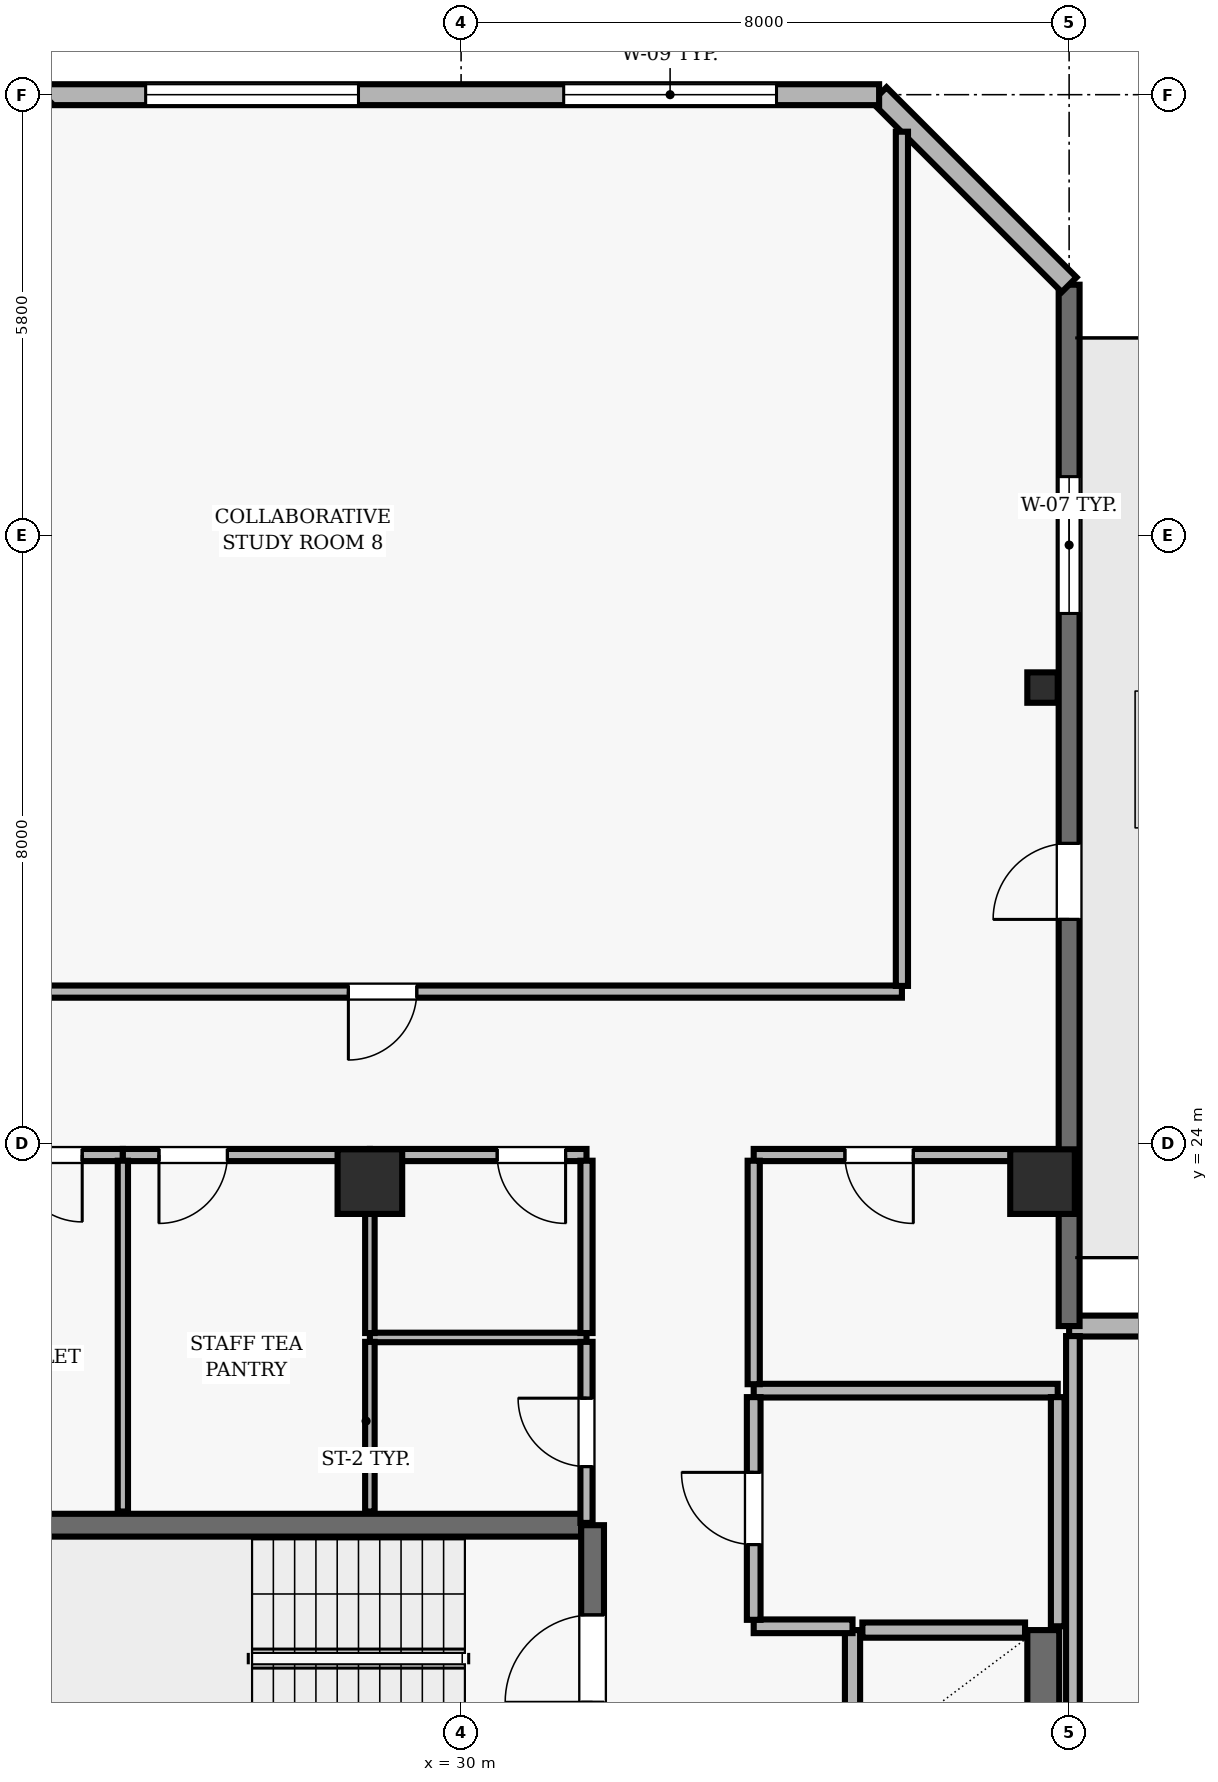
"""IFC4 building model, lengths in metres.
Left out: names, types, materials, properties, quantities, classifications, styles, units other than length and angle.
Written with IfcOpenShell. Run it as: python <this file> out.ifc"""

import sys

from ifc_helpers import new_model, si_unit, direction, frame, frame_2d, origin, origin_2d, place, context, subcontext, project, spatial, rectangle, hollow_rectangle, extrude, element, fill, save


model = new_model("IFC4")
c1 = context("Model", 3, precision=1e-05, world=origin(), true_north=direction((0.0, 1.0)))
c2 = subcontext(c1, "Body", "Model", "MODEL_VIEW")
j1 = project(units=[si_unit("LENGTHUNIT", "METRE"), si_unit("PLANEANGLEUNIT", "RADIAN")], contexts=[c1])
p1 = place(None, origin())
s1 = spatial("IfcSite", under=j1, at=p1, CompositionType="ELEMENT")
p2 = place(p1, origin())
s2 = spatial("IfcBuilding", under=s1, at=p2, CompositionType="ELEMENT")
p3 = place(p2, frame((0.0, 0.0, 287.2)))
s3 = spatial("IfcBuildingStorey", under=s2, at=p3, CompositionType="ELEMENT", Elevation=287.2)
for number, where, z_axis, x_axis in (
    (1, (28.8, 23.5, 0.0), (0.0, 0.0, 1.0), (1.0, 0.0, 0.0)),
    (2, (37.65, 23.5, 0.0), (0.0, 0.0, 1.0), (1.0, 0.0, 0.0)),
):
    element("IfcColumn", number, at=place(p3, frame(where, z_axis=z_axis, x_axis=x_axis)), inside=s3, PredefinedType="COLUMN", context=c2, shape_type="SweptSolid", body=[
        extrude(rectangle(XDim=0.85, YDim=0.85, at=origin_2d()), origin(), (0.0, 0.0, 1.0), 3.9),
    ])
p4 = place(p3, frame((37.65, 30.0, 0.0), z_axis=(0.0, 0.0, 1.0), x_axis=(1.0, 0.0, 0.0)))
e3 = element("IfcColumn", 3, at=p4, inside=s3, PredefinedType="COLUMN", context=c2, shape_type="SweptSolid", body=[
    extrude(hollow_rectangle(XDim=0.4, YDim=0.4, WallThickness=0.02, at=origin_2d()), origin(), (0.0, 0.0, 1.0), 3.9),
])
p5 = place(p3, frame((43.0, 21.6, 0.0), z_axis=(0.0, 0.0, 1.0), x_axis=(-1.0, 0.0, 0.0)))
e4 = element("IfcWall", 4, at=p5, inside=s3, PredefinedType="SOLIDWALL", context=c2, shape_type="SweptSolid", body=[
    extrude(rectangle(XDim=5.0, YDim=0.275, at=frame_2d((2.5, 0.0))), origin(), (0.0, 0.0, 1.0), 3.69),
])
p6 = place(p3, frame((38.0, 21.6, 0.0), z_axis=(0.0, 0.0, 1.0), x_axis=(0.0, 1.0, 0.0)))
e5 = element("IfcWall", 5, at=p6, inside=s3, PredefinedType="SOLIDWALL", context=c2, shape_type="SweptSolid", body=[
    extrude(rectangle(XDim=13.7, YDim=0.275, at=frame_2d((6.85, 0.0))), origin(), (0.0, 0.0, 1.0), 3.69),
])
p7 = place(p6, frame((5.35, 0.0, 0.0)))
e6 = element("IfcOpeningElement", 6, at=p7, cuts=e5, PredefinedType="OPENING", context=c2, shape_type="SweptSolid", body=[
    extrude(rectangle(XDim=1.0, YDim=2.2, at=frame_2d((0.5, 1.1))), frame((0.0, 0.147, 0.0), z_axis=(0.0, -1.0, 0.0), x_axis=(1.0, 0.0, 0.0)), (0.0, 0.0, 1.0), 0.295),
])
p8 = place(p6, frame((9.375, 0.0, 0.9)))
e7 = element("IfcOpeningElement", 7, at=p8, cuts=e5, PredefinedType="OPENING", context=c2, shape_type="SweptSolid", body=[
    extrude(rectangle(XDim=1.8, YDim=1.8, at=frame_2d((0.9, 0.9))), frame((0.0, 0.147, 0.0), z_axis=(0.0, -1.0, 0.0), x_axis=(1.0, 0.0, 0.0)), (0.0, 0.0, 1.0), 0.295),
])
p9 = place(p3, frame((38.0, 35.3, 0.0), z_axis=(0.0, 0.0, 1.0), x_axis=(-0.707106781187, 0.707106781187, 0.0)))
e8 = element("IfcWall", 8, at=p9, inside=s3, PredefinedType="SOLIDWALL", context=c2, shape_type="SweptSolid", body=[
    extrude(rectangle(XDim=3.536, YDim=0.275, at=frame_2d((1.768, 0.0))), origin(), (0.0, 0.0, 1.0), 3.69),
])
p10 = place(p3, frame((35.5, 37.8, 0.0), z_axis=(0.0, 0.0, 1.0), x_axis=(-1.0, 0.0, 0.0)))
e9 = element("IfcWall", 9, at=p10, inside=s3, PredefinedType="SOLIDWALL", context=c2, shape_type="SweptSolid", body=[
    extrude(rectangle(XDim=11.0, YDim=0.275, at=frame_2d((5.5, 0.0))), origin(), (0.0, 0.0, 1.0), 3.69),
])
p11 = place(p10, frame((1.35, 0.0, 0.9)))
e10 = element("IfcOpeningElement", 10, at=p11, cuts=e9, PredefinedType="OPENING", context=c2, shape_type="SweptSolid", body=[
    extrude(rectangle(XDim=2.8, YDim=1.8, at=frame_2d((1.4, 0.9))), frame((0.0, 0.147, 0.0), z_axis=(0.0, -1.0, 0.0), x_axis=(1.0, 0.0, 0.0)), (0.0, 0.0, 1.0), 0.295),
])
p12 = place(p10, frame((6.85, 0.0, 0.9)))
e11 = element("IfcOpeningElement", 11, at=p12, cuts=e9, PredefinedType="OPENING", context=c2, shape_type="SweptSolid", body=[
    extrude(rectangle(XDim=2.8, YDim=1.8, at=frame_2d((1.4, 0.9))), frame((0.0, 0.147, 0.0), z_axis=(0.0, -1.0, 0.0), x_axis=(1.0, 0.0, 0.0)), (0.0, 0.0, 1.0), 0.295),
])
p13 = place(p3, frame((31.58, 18.98, 0.0), z_axis=(0.0, 0.0, 1.0), x_axis=(-1.0, 0.0, 0.0)))
e12 = element("IfcWall", 12, at=p13, inside=s3, PredefinedType="SHEAR", context=c2, shape_type="SweptSolid", body=[
    extrude(rectangle(XDim=8.36, YDim=0.3, at=frame_2d((4.18, 0.0))), origin(), (0.0, 0.0, 1.0), 3.69),
])
p14 = place(p3, frame((31.73, 15.47, 0.0), z_axis=(0.0, 0.0, 1.0), x_axis=(0.0, 1.0, 0.0)))
e13 = element("IfcWall", 13, at=p14, inside=s3, PredefinedType="SHEAR", context=c2, shape_type="SweptSolid", body=[
    extrude(rectangle(XDim=3.51, YDim=0.3, at=frame_2d((1.755, 0.0))), origin(), (0.0, 0.0, 1.0), 3.69),
])
p15 = place(p14, frame((1.18, 0.0, 0.0)))
e14 = element("IfcOpeningElement", 14, at=p15, cuts=e13, PredefinedType="OPENING", context=c2, shape_type="SweptSolid", body=[
    extrude(rectangle(XDim=1.15, YDim=2.15, at=frame_2d((0.575, 1.075))), frame((0.0, 0.16, 0.0), z_axis=(0.0, -1.0, 0.0), x_axis=(1.0, 0.0, 0.0)), (0.0, 0.0, 1.0), 0.32),
])
p16 = place(p3, frame((35.15, 17.6, 0.0), z_axis=(0.0, 0.0, 1.0), x_axis=(0.0, -1.0, 0.0)))
e15 = element("IfcWall", 15, at=p16, inside=s3, PredefinedType="SOLIDWALL", context=c2, shape_type="SweptSolid", body=[
    extrude(rectangle(XDim=1.85, YDim=0.2, at=frame_2d((0.925, 0.0))), origin(), (0.0, 0.0, 1.0), 3.69),
])
p17 = place(p3, frame((37.66, 15.75, 0.0), z_axis=(0.0, 0.0, 1.0), x_axis=(0.0, 1.0, 0.0)))
e16 = element("IfcWall", 16, at=p17, inside=s3, PredefinedType="SHEAR", context=c2, shape_type="SweptSolid", body=[
    extrude(rectangle(XDim=1.85, YDim=0.42, at=frame_2d((0.925, 0.0))), origin(), (0.0, 0.0, 1.0), 3.69),
])
p18 = place(p3, frame((37.42, 17.6, 0.0), z_axis=(0.0, 0.0, 1.0), x_axis=(-1.0, 0.0, 0.0)))
e17 = element("IfcWall", 17, at=p18, inside=s3, PredefinedType="SOLIDWALL", context=c2, shape_type="SweptSolid", body=[
    extrude(rectangle(XDim=2.14, YDim=0.2, at=frame_2d((1.07, 0.0))), origin(), (0.0, 0.0, 1.0), 3.69),
])
p19 = place(p3, frame((25.55, 23.85, 0.0), z_axis=(0.0, 0.0, 1.0), x_axis=(-1.0, 0.0, 0.0)))
e18 = element("IfcWall", 18, at=p19, inside=s3, PredefinedType="PARTITIONING", context=c2, shape_type="SweptSolid", body=[
    extrude(rectangle(XDim=3.35, YDim=0.16, at=frame_2d((1.675, 0.0))), origin(), (0.0, 0.0, 1.0), 3.221),
])
p20 = place(p19, frame((0.535, 0.0, 0.0)))
e19 = element("IfcOpeningElement", 19, at=p20, cuts=e18, PredefinedType="OPENING", context=c2, shape_type="SweptSolid", body=[
    extrude(rectangle(XDim=0.88, YDim=2.1, at=frame_2d((0.44, 1.05))), frame((0.0, 0.09, 0.0), z_axis=(0.0, -1.0, 0.0), x_axis=(1.0, 0.0, 0.0)), (0.0, 0.0, 1.0), 0.18),
])
p21 = place(p3, frame((28.8, 23.85, 0.0), z_axis=(0.0, 0.0, 1.0), x_axis=(-1.0, 0.0, 0.0)))
e20 = element("IfcWall", 20, at=p21, inside=s3, PredefinedType="PARTITIONING", context=c2, shape_type="SweptSolid", body=[
    extrude(rectangle(XDim=3.25, YDim=0.16, at=frame_2d((1.625, 0.0))), origin(), (0.0, 0.0, 1.0), 3.221),
])
p22 = place(p21, frame((1.875, 0.0, 0.0)))
e21 = element("IfcOpeningElement", 21, at=p22, cuts=e20, PredefinedType="OPENING", context=c2, shape_type="SweptSolid", body=[
    extrude(rectangle(XDim=0.9, YDim=2.1, at=frame_2d((0.45, 1.05))), frame((0.0, 0.09, 0.0), z_axis=(0.0, -1.0, 0.0), x_axis=(1.0, 0.0, 0.0)), (0.0, 0.0, 1.0), 0.18),
])
p23 = place(p3, frame((31.65, 21.45, 0.0), z_axis=(0.0, 0.0, 1.0), x_axis=(-1.0, 0.0, 0.0)))
e22 = element("IfcWall", 22, at=p23, inside=s3, PredefinedType="PARTITIONING", context=c2, shape_type="SweptSolid", body=[
    extrude(rectangle(XDim=2.85, YDim=0.125, at=frame_2d((1.425, 0.0))), origin(), (0.0, 0.0, 1.0), 3.69),
])
p24 = place(p3, frame((31.65, 23.85, 0.0), z_axis=(0.0, 0.0, 1.0), x_axis=(-1.0, 0.0, 0.0)))
e23 = element("IfcWall", 23, at=p24, inside=s3, PredefinedType="PARTITIONING", context=c2, shape_type="SweptSolid", body=[
    extrude(rectangle(XDim=2.85, YDim=0.16, at=frame_2d((1.425, 0.0))), origin(), (0.0, 0.0, 1.0), 3.221),
])
p25 = place(p24, frame((0.275, 0.0, 0.0)))
e24 = element("IfcOpeningElement", 24, at=p25, cuts=e23, PredefinedType="OPENING", context=c2, shape_type="SweptSolid", body=[
    extrude(rectangle(XDim=0.9, YDim=2.1, at=frame_2d((0.45, 1.05))), frame((0.0, 0.09, 0.0), z_axis=(0.0, -1.0, 0.0), x_axis=(1.0, 0.0, 0.0)), (0.0, 0.0, 1.0), 0.18),
])
p26 = place(p3, frame((33.85, 17.65, 0.0), z_axis=(0.0, 0.0, 1.0), x_axis=(1.0, 0.0, 0.0)))
e25 = element("IfcWall", 25, at=p26, inside=s3, PredefinedType="PARTITIONING", context=c2, shape_type="SweptSolid", body=[
    extrude(rectangle(XDim=1.3, YDim=0.18, at=frame_2d((0.65, 0.0))), origin(), (0.0, 0.0, 1.0), 3.69),
])
p27 = place(p3, frame((35.8, 26.0, 0.0), z_axis=(0.0, 0.0, 1.0), x_axis=(-1.0, 0.0, 0.0)))
e26 = element("IfcWall", 26, at=p27, inside=s3, PredefinedType="PARTITIONING", context=c2, shape_type="SweptSolid", body=[
    extrude(rectangle(XDim=13.667, YDim=0.16, at=frame_2d((6.833, 0.0))), origin(), (0.0, 0.0, 1.0), 3.69),
])
p28 = place(p27, frame((6.383, 0.0, 0.0)))
e27 = element("IfcOpeningElement", 27, at=p28, cuts=e26, PredefinedType="OPENING", context=c2, shape_type="SweptSolid", body=[
    extrude(rectangle(XDim=0.9, YDim=2.1, at=frame_2d((0.45, 1.05))), frame((0.0, 0.09, 0.0), z_axis=(0.0, -1.0, 0.0), x_axis=(1.0, 0.0, 0.0)), (0.0, 0.0, 1.0), 0.18),
])
p29 = place(p3, frame((37.85, 20.75, 0.0), z_axis=(0.0, 0.0, 1.0), x_axis=(-1.0, 0.0, 0.0)))
e28 = element("IfcWall", 28, at=p29, inside=s3, PredefinedType="PARTITIONING", context=c2, shape_type="SweptSolid", body=[
    extrude(rectangle(XDim=4.0, YDim=0.18, at=frame_2d((2.0, 0.0))), origin(), (0.0, 0.0, 1.0), 3.69),
])
p30 = place(p3, frame((37.85, 23.85, 0.0), z_axis=(0.0, 0.0, 1.0), x_axis=(-1.0, 0.0, 0.0)))
e29 = element("IfcWall", 29, at=p30, inside=s3, PredefinedType="PARTITIONING", context=c2, shape_type="SweptSolid", body=[
    extrude(rectangle(XDim=4.0, YDim=0.16, at=frame_2d((2.0, 0.0))), origin(), (0.0, 0.0, 1.0), 3.221),
])
p31 = place(p30, frame((1.9, 0.0, 0.0)))
e30 = element("IfcOpeningElement", 30, at=p31, cuts=e29, PredefinedType="OPENING", context=c2, shape_type="SweptSolid", body=[
    extrude(rectangle(XDim=0.9, YDim=2.1, at=frame_2d((0.45, 1.05))), frame((0.0, 0.09, 0.0), z_axis=(0.0, -1.0, 0.0), x_axis=(1.0, 0.0, 0.0)), (0.0, 0.0, 1.0), 0.18),
])
p32 = place(p3, frame((25.55, 19.16, 0.0), z_axis=(0.0, 0.0, 1.0), x_axis=(0.0, 1.0, 0.0)))
e31 = element("IfcWall", 31, at=p32, inside=s3, PredefinedType="PARTITIONING", context=c2, shape_type="SweptSolid", body=[
    extrude(rectangle(XDim=4.615, YDim=0.135, at=frame_2d((2.308, 0.0))), origin(), (0.0, 0.0, 1.0), 3.69),
])
p33 = place(p3, frame((28.8, 21.392, 0.0), z_axis=(0.0, 0.0, 1.0), x_axis=(0.0, -1.0, 0.0)))
e32 = element("IfcWall", 32, at=p33, inside=s3, PredefinedType="PARTITIONING", context=c2, shape_type="SweptSolid", body=[
    extrude(rectangle(XDim=2.232, YDim=0.125, at=frame_2d((1.116, 0.0))), origin(), (0.0, 0.0, 1.0), 3.69),
])
p34 = place(p3, frame((28.8, 23.775, 0.0), z_axis=(0.0, 0.0, 1.0), x_axis=(0.0, -1.0, 0.0)))
e33 = element("IfcWall", 33, at=p34, inside=s3, PredefinedType="PARTITIONING", context=c2, shape_type="SweptSolid", body=[
    extrude(rectangle(XDim=2.267, YDim=0.125, at=frame_2d((1.133, 0.0))), origin(), (0.0, 0.0, 1.0), 3.69),
])
p35 = place(p3, frame((31.65, 19.01, 0.0), z_axis=(0.0, 0.0, 1.0), x_axis=(0.0, 1.0, 0.0)))
e34 = element("IfcWall", 34, at=p35, inside=s3, PredefinedType="PARTITIONING", context=c2, shape_type="SweptSolid", body=[
    extrude(rectangle(XDim=2.382, YDim=0.16, at=frame_2d((1.191, 0.0))), origin(), (0.0, 0.0, 1.0), 3.69),
])
p36 = place(p35, frame((0.741, 0.0, 0.0)))
e35 = element("IfcOpeningElement", 35, at=p36, cuts=e34, PredefinedType="OPENING", context=c2, shape_type="SweptSolid", body=[
    extrude(rectangle(XDim=0.9, YDim=2.1, at=frame_2d((0.45, 1.05))), frame((0.0, 0.09, 0.0), z_axis=(0.0, -1.0, 0.0), x_axis=(1.0, 0.0, 0.0)), (0.0, 0.0, 1.0), 0.18),
])
p37 = place(p3, frame((31.65, 23.775, 0.0), z_axis=(0.0, 0.0, 1.0), x_axis=(0.0, -1.0, 0.0)))
e36 = element("IfcWall", 36, at=p37, inside=s3, PredefinedType="PARTITIONING", context=c2, shape_type="SweptSolid", body=[
    extrude(rectangle(XDim=2.267, YDim=0.16, at=frame_2d((1.133, 0.0))), origin(), (0.0, 0.0, 1.0), 3.69),
])
p38 = place(p3, frame((33.85, 17.735, 0.0), z_axis=(0.0, 0.0, 1.0), x_axis=(0.0, 1.0, 0.0)))
e37 = element("IfcWall", 37, at=p38, inside=s3, PredefinedType="PARTITIONING", context=c2, shape_type="SweptSolid", body=[
    extrude(rectangle(XDim=2.93, YDim=0.18, at=frame_2d((1.465, 0.0))), origin(), (0.0, 0.0, 1.0), 3.69),
])
p39 = place(p38, frame((0.99, 0.0, 0.0)))
e38 = element("IfcOpeningElement", 38, at=p39, cuts=e37, PredefinedType="OPENING", context=c2, shape_type="SweptSolid", body=[
    extrude(rectangle(XDim=0.95, YDim=2.1, at=frame_2d((0.475, 1.05))), frame((0.0, 0.1, 0.0), z_axis=(0.0, -1.0, 0.0), x_axis=(1.0, 0.0, 0.0)), (0.0, 0.0, 1.0), 0.2),
])
p40 = place(p3, frame((33.85, 20.835, 0.0), z_axis=(0.0, 0.0, 1.0), x_axis=(0.0, 1.0, 0.0)))
e39 = element("IfcWall", 39, at=p40, inside=s3, PredefinedType="PARTITIONING", context=c2, shape_type="SweptSolid", body=[
    extrude(rectangle(XDim=2.94, YDim=0.16, at=frame_2d((1.47, 0.0))), origin(), (0.0, 0.0, 1.0), 3.69),
])
p41 = place(p3, frame((35.8, 37.313, 0.0), z_axis=(0.0, 0.0, 1.0), x_axis=(0.0, -1.0, 0.0)))
e40 = element("IfcWall", 40, at=p41, inside=s3, PredefinedType="PARTITIONING", context=c2, shape_type="SweptSolid", body=[
    extrude(rectangle(XDim=11.238, YDim=0.16, at=frame_2d((5.619, 0.0))), origin(), (0.0, 0.0, 1.0), 3.69),
])
p42 = place(p3, frame((37.85, 17.65, 0.0), z_axis=(0.0, 0.0, 1.0), x_axis=(0.0, 1.0, 0.0)))
e41 = element("IfcWall", 41, at=p42, inside=s3, PredefinedType="PARTITIONING", context=c2, shape_type="SweptSolid", body=[
    extrude(rectangle(XDim=3.015, YDim=0.18, at=frame_2d((1.508, 0.0))), origin(), (0.0, 0.0, 1.0), 3.221),
])
p43 = place(p3, frame((38.05, 21.468, 0.0), z_axis=(0.0, 0.0, 1.0), x_axis=(0.0, -1.0, 0.0)))
e42 = element("IfcWall", 42, at=p43, inside=s3, PredefinedType="PARTITIONING", context=c2, shape_type="SweptSolid", body=[
    extrude(rectangle(XDim=5.393, YDim=0.18, at=frame_2d((2.697, 0.0))), origin(), (0.0, 0.0, 1.0), 3.221),
])
p44 = place(p7, origin())
e43 = element("IfcDoor", 43, at=p44, inside=s3, OperationType="SINGLE_SWING_LEFT", PredefinedType="DOOR", context=c2, shape_type="SweptSolid", body=[
    extrude(rectangle(XDim=1.0, YDim=2.2, at=frame_2d((0.5, 1.1))), frame((0.0, 0.025, 0.0), z_axis=(0.0, -1.0, 0.0), x_axis=(1.0, 0.0, 0.0)), (0.0, 0.0, 1.0), 0.05),
])
fill(e6, e43)
p45 = place(p8, origin())
e44 = element("IfcWindow", 44, at=p45, inside=s3, PartitioningType="SINGLE_PANEL", PredefinedType="WINDOW", context=c2, shape_type="SweptSolid", body=[
    extrude(rectangle(XDim=1.8, YDim=1.8, at=frame_2d((0.9, 0.9))), frame((0.0, 0.03, 0.0), z_axis=(0.0, -1.0, 0.0), x_axis=(1.0, 0.0, 0.0)), (0.0, 0.0, 1.0), 0.06),
])
fill(e7, e44)
p46 = place(p11, origin())
e45 = element("IfcWindow", 45, at=p46, inside=s3, PartitioningType="SINGLE_PANEL", PredefinedType="WINDOW", context=c2, shape_type="SweptSolid", body=[
    extrude(rectangle(XDim=2.8, YDim=1.8, at=frame_2d((1.4, 0.9))), frame((0.0, 0.03, 0.0), z_axis=(0.0, -1.0, 0.0), x_axis=(1.0, 0.0, 0.0)), (0.0, 0.0, 1.0), 0.06),
])
fill(e10, e45)
p47 = place(p12, origin())
e46 = element("IfcWindow", 46, at=p47, inside=s3, PartitioningType="SINGLE_PANEL", PredefinedType="WINDOW", context=c2, shape_type="SweptSolid", body=[
    extrude(rectangle(XDim=2.8, YDim=1.8, at=frame_2d((1.4, 0.9))), frame((0.0, 0.03, 0.0), z_axis=(0.0, -1.0, 0.0), x_axis=(1.0, 0.0, 0.0)), (0.0, 0.0, 1.0), 0.06),
])
fill(e11, e46)
p48 = place(p15, origin())
e47 = element("IfcDoor", 47, at=p48, inside=s3, OperationType="SINGLE_SWING_LEFT", PredefinedType="DOOR", context=c2, shape_type="SweptSolid", body=[
    extrude(rectangle(XDim=1.15, YDim=2.15, at=frame_2d((0.575, 1.075))), frame((0.0, 0.025, 0.0), z_axis=(0.0, -1.0, 0.0), x_axis=(1.0, 0.0, 0.0)), (0.0, 0.0, 1.0), 0.05),
])
fill(e14, e47)
p49 = place(p39, origin())
e48 = element("IfcDoor", 48, at=p49, inside=s3, OperationType="SINGLE_SWING_RIGHT", PredefinedType="DOOR", context=c2, shape_type="SweptSolid", body=[
    extrude(rectangle(XDim=0.95, YDim=2.1, at=frame_2d((0.475, 1.05))), frame((0.0, 0.025, 0.0), z_axis=(0.0, -1.0, 0.0), x_axis=(1.0, 0.0, 0.0)), (0.0, 0.0, 1.0), 0.05),
])
fill(e38, e48)
p50 = place(p31, origin())
e49 = element("IfcDoor", 49, at=p50, inside=s3, OperationType="SINGLE_SWING_LEFT", PredefinedType="DOOR", context=c2, shape_type="SweptSolid", body=[
    extrude(rectangle(XDim=0.9, YDim=2.1, at=frame_2d((0.45, 1.05))), frame((0.0, 0.025, 0.0), z_axis=(0.0, -1.0, 0.0), x_axis=(1.0, 0.0, 0.0)), (0.0, 0.0, 1.0), 0.05),
])
fill(e30, e49)
p51 = place(p36, origin())
e50 = element("IfcDoor", 50, at=p51, inside=s3, OperationType="SINGLE_SWING_RIGHT", PredefinedType="DOOR", context=c2, shape_type="SweptSolid", body=[
    extrude(rectangle(XDim=0.9, YDim=2.1, at=frame_2d((0.45, 1.05))), frame((0.0, 0.025, 0.0), z_axis=(0.0, -1.0, 0.0), x_axis=(1.0, 0.0, 0.0)), (0.0, 0.0, 1.0), 0.05),
])
fill(e35, e50)
p52 = place(p25, origin())
e51 = element("IfcDoor", 51, at=p52, inside=s3, OperationType="SINGLE_SWING_LEFT", PredefinedType="DOOR", context=c2, shape_type="SweptSolid", body=[
    extrude(rectangle(XDim=0.9, YDim=2.1, at=frame_2d((0.45, 1.05))), frame((0.0, 0.025, 0.0), z_axis=(0.0, -1.0, 0.0), x_axis=(1.0, 0.0, 0.0)), (0.0, 0.0, 1.0), 0.05),
])
fill(e24, e51)
p53 = place(p20, origin())
e52 = element("IfcDoor", 52, at=p53, inside=s3, OperationType="SINGLE_SWING_LEFT", PredefinedType="DOOR", context=c2, shape_type="SweptSolid", body=[
    extrude(rectangle(XDim=0.88, YDim=2.1, at=frame_2d((0.44, 1.05))), frame((0.0, 0.025, 0.0), z_axis=(0.0, -1.0, 0.0), x_axis=(1.0, 0.0, 0.0)), (0.0, 0.0, 1.0), 0.05),
])
fill(e19, e52)
p54 = place(p22, origin())
e53 = element("IfcDoor", 53, at=p54, inside=s3, OperationType="SINGLE_SWING_RIGHT", PredefinedType="DOOR", context=c2, shape_type="SweptSolid", body=[
    extrude(rectangle(XDim=0.9, YDim=2.1, at=frame_2d((0.45, 1.05))), frame((0.0, 0.025, 0.0), z_axis=(0.0, -1.0, 0.0), x_axis=(1.0, 0.0, 0.0)), (0.0, 0.0, 1.0), 0.05),
])
fill(e21, e53)
p55 = place(p28, origin())
e54 = element("IfcDoor", 54, at=p55, inside=s3, OperationType="SINGLE_SWING_RIGHT", PredefinedType="DOOR", context=c2, shape_type="SweptSolid", body=[
    extrude(rectangle(XDim=0.9, YDim=2.1, at=frame_2d((0.45, 1.05))), frame((0.0, 0.025, 0.0), z_axis=(0.0, -1.0, 0.0), x_axis=(1.0, 0.0, 0.0)), (0.0, 0.0, 1.0), 0.05),
])
fill(e27, e54)
save(model, sys.argv[1])
